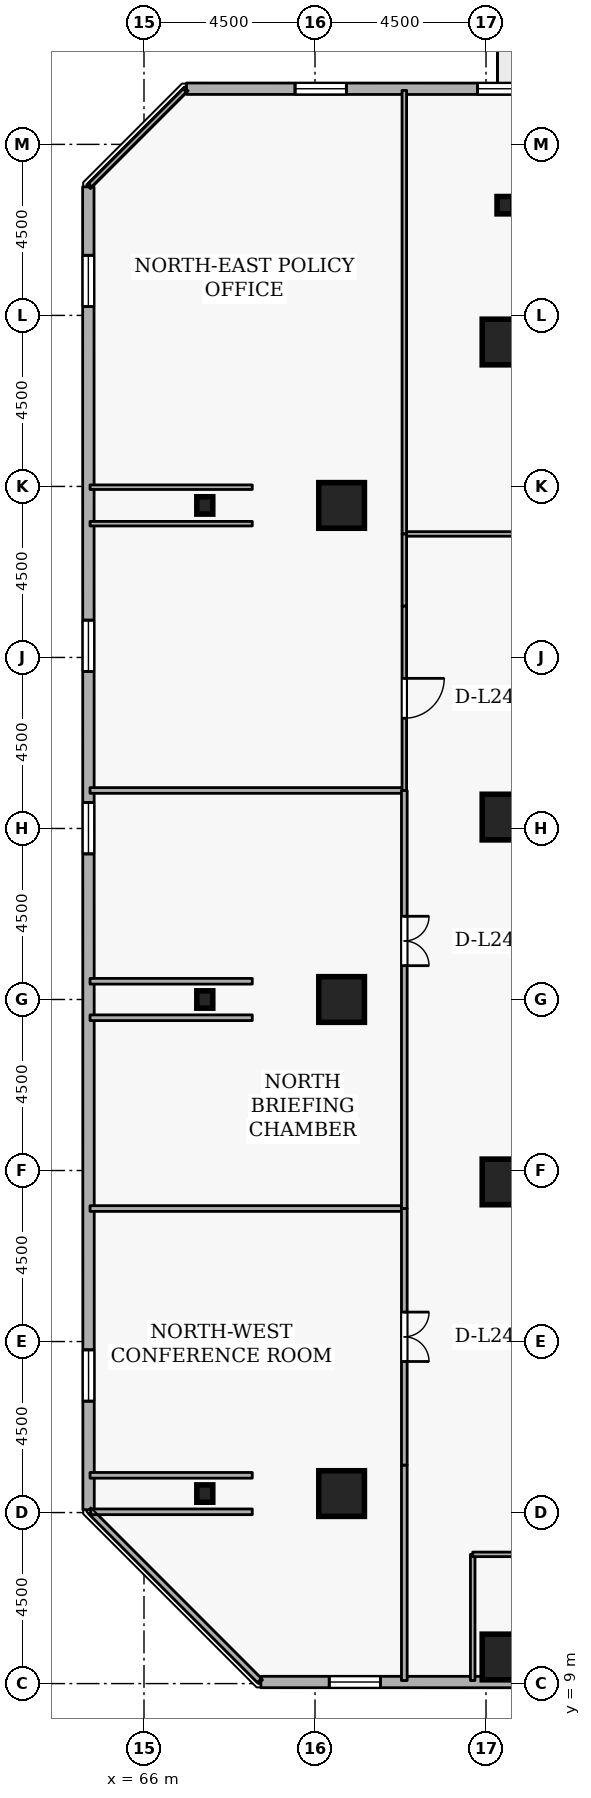
"""IFC4 building model, lengths in metres.
Left out: names, types, materials, properties, quantities, classifications, styles, units other than length and angle.
Written with IfcOpenShell. Run it as: python <this file> out.ifc"""

import sys

from ifc_helpers import new_model, si_unit, direction, frame, frame_2d, origin, origin_2d, place, context, subcontext, project, spatial, rectangle, i_section, extrude, element, fill, save


model = new_model("IFC4")
c1 = context("Model", 3, precision=1e-05, world=origin(), true_north=direction((0.0, 1.0)))
c2 = subcontext(c1, "Body", "Model", "MODEL_VIEW")
j1 = project(units=[si_unit("LENGTHUNIT", "METRE"), si_unit("PLANEANGLEUNIT", "RADIAN")], contexts=[c1])
p1 = place(None, origin())
s1 = spatial("IfcSite", under=j1, at=p1, CompositionType="ELEMENT")
p2 = place(p1, origin())
s2 = spatial("IfcBuilding", under=s1, at=p2, CompositionType="ELEMENT")
p3 = place(p2, frame((0.0, 0.0, 94.5)))
s3 = spatial("IfcBuildingStorey", under=s2, at=p3, CompositionType="ELEMENT", Elevation=94.5)
for number, where, z_axis, x_axis in (
    (1, (75.5, 44.3, 0.0), (0.0, 0.0, 1.0), (1.0, 0.0, 0.0)),
    (2, (71.2, 14.0, 0.0), (0.0, 0.0, 1.0), (1.0, 0.0, 0.0)),
    (3, (71.2, 27.0, 0.0), (0.0, 0.0, 1.0), (1.0, 0.0, 0.0)),
    (4, (71.2, 40.0, 0.0), (0.0, 0.0, 1.0), (1.0, 0.0, 0.0)),
    (5, (75.5, 9.7, 0.0), (0.0, 0.0, 1.0), (1.0, 0.0, 0.0)),
    (6, (75.5, 22.2, 0.0), (0.0, 0.0, 1.0), (1.0, 0.0, 0.0)),
    (7, (75.5, 31.8, 0.0), (0.0, 0.0, 1.0), (1.0, 0.0, 0.0)),
):
    element("IfcColumn", number, at=place(p3, frame(where, z_axis=z_axis, x_axis=x_axis)), inside=s3, PredefinedType="COLUMN", context=c2, shape_type="SweptSolid", body=[
        extrude(rectangle(XDim=1.2, YDim=1.2, at=origin_2d()), origin(), (0.0, 0.0, 1.0), 3.6),
    ])
for number, where, z_axis, x_axis in (
    (8, (75.5, 47.9, 0.0), (0.0, 0.0, 1.0), (1.0, 0.0, 0.0)),
    (9, (67.6, 14.0, 0.0), (0.0, 0.0, 1.0), (1.0, 0.0, 0.0)),
    (10, (67.6, 27.0, 0.0), (0.0, 0.0, 1.0), (1.0, 0.0, 0.0)),
    (11, (67.6, 40.0, 0.0), (0.0, 0.0, 1.0), (1.0, 0.0, 0.0)),
):
    element("IfcColumn", number, at=place(p3, frame(where, z_axis=z_axis, x_axis=x_axis)), inside=s3, PredefinedType="COLUMN", context=c2, shape_type="SweptSolid", body=[
        extrude(i_section(OverallWidth=0.418, OverallDepth=0.456, WebThickness=0.042, FlangeThickness=0.067, FilletRadius=0.015, at=origin_2d()), origin(), (0.0, 0.0, 1.0), 3.6),
    ])
p4 = place(p3, frame((69.075, 9.042, 0.0), z_axis=(0.0, 0.0, 1.0), x_axis=(0.999999983371, -0.000182370391, 0.0)))
e12 = element("IfcWall", 12, at=p4, inside=s3, PredefinedType="STANDARD", context=c2, shape_type="SweptSolid", body=[
    extrude(rectangle(XDim=34.806, YDim=0.3, at=frame_2d((17.403, 0.0))), origin(), (0.0, 0.0, 1.0), 2.22),
])
p5 = place(p4, frame((1.8, 0.0, 0.72)))
e13 = element("IfcOpeningElement", 13, at=p5, cuts=e12, PredefinedType="OPENING", context=c2, shape_type="SweptSolid", body=[
    extrude(rectangle(XDim=1.35, YDim=1.05, at=frame_2d((0.675, 0.525))), frame((0.0, 0.16, 0.0), z_axis=(0.0, -1.0, 0.0), x_axis=(1.0, 0.0, 0.0)), (0.0, 0.0, 1.0), 0.32),
])
p6 = place(p4, frame((11.4, 0.0, 0.72)))
e14 = element("IfcOpeningElement", 14, at=p6, cuts=e12, PredefinedType="OPENING", context=c2, shape_type="SweptSolid", body=[
    extrude(rectangle(XDim=1.35, YDim=1.05, at=frame_2d((0.675, 0.525))), frame((0.0, 0.16, 0.0), z_axis=(0.0, -1.0, 0.0), x_axis=(1.0, 0.0, 0.0)), (0.0, 0.0, 1.0), 0.32),
])
p7 = place(p4, frame((21.0, 0.0, 0.72)))
e15 = element("IfcOpeningElement", 15, at=p7, cuts=e12, PredefinedType="OPENING", context=c2, shape_type="SweptSolid", body=[
    extrude(rectangle(XDim=1.35, YDim=1.05, at=frame_2d((0.675, 0.525))), frame((0.0, 0.16, 0.0), z_axis=(0.0, -1.0, 0.0), x_axis=(1.0, 0.0, 0.0)), (0.0, 0.0, 1.0), 0.32),
])
p8 = place(p4, frame((25.8, 0.0, 0.72)))
e16 = element("IfcOpeningElement", 16, at=p8, cuts=e12, PredefinedType="OPENING", context=c2, shape_type="SweptSolid", body=[
    extrude(rectangle(XDim=1.35, YDim=1.05, at=frame_2d((0.675, 0.525))), frame((0.0, 0.16, 0.0), z_axis=(0.0, -1.0, 0.0), x_axis=(1.0, 0.0, 0.0)), (0.0, 0.0, 1.0), 0.32),
])
p9 = place(p3, frame((101.925, 50.958, 0.0), z_axis=(0.0, 0.0, 1.0), x_axis=(-0.999999983371, 0.000182370391, 0.0)))
e17 = element("IfcWall", 17, at=p9, inside=s3, PredefinedType="STANDARD", context=c2, shape_type="SweptSolid", body=[
    extrude(rectangle(XDim=34.806, YDim=0.3, at=frame_2d((17.403, 0.0))), origin(), (0.0, 0.0, 1.0), 2.22),
])
p10 = place(p9, frame((19.203, 0.0, 0.0)))
e18 = element("IfcOpeningElement", 18, at=p10, cuts=e17, PredefinedType="OPENING", context=c2, shape_type="SweptSolid", body=[
    extrude(rectangle(XDim=1.0, YDim=2.08, at=frame_2d((0.5, 1.04))), frame((0.0, 0.16, 0.0), z_axis=(0.0, -1.0, 0.0), x_axis=(1.0, 0.0, 0.0)), (0.0, 0.0, 1.0), 0.32),
])
p11 = place(p9, frame((1.8, 0.0, 0.72)))
e19 = element("IfcOpeningElement", 19, at=p11, cuts=e17, PredefinedType="OPENING", context=c2, shape_type="SweptSolid", body=[
    extrude(rectangle(XDim=1.35, YDim=1.05, at=frame_2d((0.675, 0.525))), frame((0.0, 0.16, 0.0), z_axis=(0.0, -1.0, 0.0), x_axis=(1.0, 0.0, 0.0)), (0.0, 0.0, 1.0), 0.32),
])
p12 = place(p9, frame((6.6, 0.0, 0.72)))
e20 = element("IfcOpeningElement", 20, at=p12, cuts=e17, PredefinedType="OPENING", context=c2, shape_type="SweptSolid", body=[
    extrude(rectangle(XDim=1.35, YDim=1.05, at=frame_2d((0.675, 0.525))), frame((0.0, 0.16, 0.0), z_axis=(0.0, -1.0, 0.0), x_axis=(1.0, 0.0, 0.0)), (0.0, 0.0, 1.0), 0.32),
])
p13 = place(p9, frame((11.4, 0.0, 0.72)))
e21 = element("IfcOpeningElement", 21, at=p13, cuts=e17, PredefinedType="OPENING", context=c2, shape_type="SweptSolid", body=[
    extrude(rectangle(XDim=1.35, YDim=1.05, at=frame_2d((0.675, 0.525))), frame((0.0, 0.16, 0.0), z_axis=(0.0, -1.0, 0.0), x_axis=(1.0, 0.0, 0.0)), (0.0, 0.0, 1.0), 0.32),
])
p14 = place(p9, frame((21.0, 0.0, 0.72)))
e22 = element("IfcOpeningElement", 22, at=p14, cuts=e17, PredefinedType="OPENING", context=c2, shape_type="SweptSolid", body=[
    extrude(rectangle(XDim=1.35, YDim=1.05, at=frame_2d((0.675, 0.525))), frame((0.0, 0.16, 0.0), z_axis=(0.0, -1.0, 0.0), x_axis=(1.0, 0.0, 0.0)), (0.0, 0.0, 1.0), 0.32),
])
p15 = place(p9, frame((25.8, 0.0, 0.72)))
e23 = element("IfcOpeningElement", 23, at=p15, cuts=e17, PredefinedType="OPENING", context=c2, shape_type="SweptSolid", body=[
    extrude(rectangle(XDim=1.35, YDim=1.05, at=frame_2d((0.675, 0.525))), frame((0.0, 0.16, 0.0), z_axis=(0.0, -1.0, 0.0), x_axis=(1.0, 0.0, 0.0)), (0.0, 0.0, 1.0), 0.32),
])
p16 = place(p9, frame((30.6, 0.0, 0.72)))
e24 = element("IfcOpeningElement", 24, at=p16, cuts=e17, PredefinedType="OPENING", context=c2, shape_type="SweptSolid", body=[
    extrude(rectangle(XDim=1.35, YDim=1.05, at=frame_2d((0.675, 0.525))), frame((0.0, 0.16, 0.0), z_axis=(0.0, -1.0, 0.0), x_axis=(1.0, 0.0, 0.0)), (0.0, 0.0, 1.0), 0.32),
])
p17 = place(p3, frame((64.535, 48.381, 0.0), z_axis=(0.0, 0.0, 1.0), x_axis=(0.000182370391, -0.999999983371, 0.0)))
e25 = element("IfcWall", 25, at=p17, inside=s3, PredefinedType="STANDARD", context=c2, shape_type="SweptSolid", body=[
    extrude(rectangle(XDim=34.806, YDim=0.3, at=frame_2d((17.403, 0.0))), origin(), (0.0, 0.0, 1.0), 2.22),
])
p18 = place(p17, frame((1.8, 0.0, 0.72)))
e26 = element("IfcOpeningElement", 26, at=p18, cuts=e25, PredefinedType="OPENING", context=c2, shape_type="SweptSolid", body=[
    extrude(rectangle(XDim=1.35, YDim=1.05, at=frame_2d((0.675, 0.525))), frame((0.0, 0.16, 0.0), z_axis=(0.0, -1.0, 0.0), x_axis=(1.0, 0.0, 0.0)), (0.0, 0.0, 1.0), 0.32),
])
p19 = place(p17, frame((11.4, 0.0, 0.72)))
e27 = element("IfcOpeningElement", 27, at=p19, cuts=e25, PredefinedType="OPENING", context=c2, shape_type="SweptSolid", body=[
    extrude(rectangle(XDim=1.35, YDim=1.05, at=frame_2d((0.675, 0.525))), frame((0.0, 0.16, 0.0), z_axis=(0.0, -1.0, 0.0), x_axis=(1.0, 0.0, 0.0)), (0.0, 0.0, 1.0), 0.32),
])
p20 = place(p17, frame((16.2, 0.0, 0.72)))
e28 = element("IfcOpeningElement", 28, at=p20, cuts=e25, PredefinedType="OPENING", context=c2, shape_type="SweptSolid", body=[
    extrude(rectangle(XDim=1.35, YDim=1.05, at=frame_2d((0.675, 0.525))), frame((0.0, 0.16, 0.0), z_axis=(0.0, -1.0, 0.0), x_axis=(1.0, 0.0, 0.0)), (0.0, 0.0, 1.0), 0.32),
])
p21 = place(p17, frame((30.6, 0.0, 0.72)))
e29 = element("IfcOpeningElement", 29, at=p21, cuts=e25, PredefinedType="OPENING", context=c2, shape_type="SweptSolid", body=[
    extrude(rectangle(XDim=1.35, YDim=1.05, at=frame_2d((0.675, 0.525))), frame((0.0, 0.16, 0.0), z_axis=(0.0, -1.0, 0.0), x_axis=(1.0, 0.0, 0.0)), (0.0, 0.0, 1.0), 0.32),
])
p22 = place(p3, frame((74.65, 9.08, 0.0), z_axis=(0.0, 0.0, 1.0), x_axis=(0.0, 1.0, 0.0)))
e30 = element("IfcWall", 30, at=p22, inside=s3, PredefinedType="PARTITIONING", context=c2, shape_type="SweptSolid", body=[
    extrude(rectangle(XDim=3.32, YDim=0.12, at=frame_2d((1.66, 0.0))), origin(), (0.0, 0.0, 1.0), 3.3),
])
p23 = place(p3, frame((74.65, 12.4, 0.0), z_axis=(0.0, 0.0, 1.0), x_axis=(1.0, 0.0, 0.0)))
e31 = element("IfcWall", 31, at=p23, inside=s3, PredefinedType="PARTITIONING", context=c2, shape_type="SweptSolid", body=[
    extrude(rectangle(XDim=4.802, YDim=0.12, at=frame_2d((2.401, 0.0))), origin(), (0.0, 0.0, 1.0), 3.3),
])
p24 = place(p3, frame((82.2, 39.25, 0.0), z_axis=(0.0, 0.0, 1.0), x_axis=(-1.0, 0.0, 0.0)))
e32 = element("IfcWall", 32, at=p24, inside=s3, PredefinedType="PARTITIONING", context=c2, shape_type="SweptSolid", body=[
    extrude(rectangle(XDim=9.35, YDim=0.12, at=frame_2d((4.675, 0.0))), origin(), (0.0, 0.0, 1.0), 3.3),
])
p25 = place(p24, frame((4.15, 0.0, 0.0)))
e33 = element("IfcOpeningElement", 33, at=p25, cuts=e32, PredefinedType="OPENING", context=c2, shape_type="SweptSolid", body=[
    extrude(rectangle(XDim=1.05, YDim=2.1, at=frame_2d((0.525, 1.05))), frame((0.0, 0.07, 0.0), z_axis=(0.0, -1.0, 0.0), x_axis=(1.0, 0.0, 0.0)), (0.0, 0.0, 1.0), 0.14),
])
p26 = place(p3, frame((72.85, 39.25, 0.0), z_axis=(0.0, 0.0, 1.0), x_axis=(0.0, 1.0, 0.0)))
e34 = element("IfcWall", 34, at=p26, inside=s3, PredefinedType="PARTITIONING", context=c2, shape_type="SweptSolid", body=[
    extrude(rectangle(XDim=11.67, YDim=0.12, at=frame_2d((5.835, 0.0))), origin(), (0.0, 0.0, 1.0), 3.3),
])
p27 = place(p3, frame((72.85, 14.75, 0.0), z_axis=(0.0, 0.0, 1.0), x_axis=(0.0, -1.0, 0.0)))
e35 = element("IfcWall", 35, at=p27, inside=s3, PredefinedType="PARTITIONING", context=c2, shape_type="SweptSolid", body=[
    extrude(rectangle(XDim=5.67, YDim=0.15, at=frame_2d((2.835, 0.0))), origin(), (0.0, 0.0, 1.0), 3.3),
])
p28 = place(p3, frame((69.039, 9.08, 0.0), z_axis=(0.0, 0.0, 1.0), x_axis=(-0.707106781187, 0.707106781187, 0.0)))
e36 = element("IfcWall", 36, at=p28, inside=s3, PredefinedType="PARTITIONING", context=c2, shape_type="SweptSolid", body=[
    extrude(rectangle(XDim=6.279, YDim=0.15, at=frame_2d((3.14, 0.0))), origin(), (0.0, 0.0, 1.0), 3.3),
])
p29 = place(p3, frame((64.599, 13.52, 0.0), z_axis=(0.0, 0.0, 1.0), x_axis=(1.0, 0.0, 0.0)))
e37 = element("IfcWall", 37, at=p29, inside=s3, PredefinedType="PARTITIONING", context=c2, shape_type="SweptSolid", body=[
    extrude(rectangle(XDim=4.25, YDim=0.15, at=frame_2d((2.125, 0.0))), origin(), (0.0, 0.0, 1.0), 1.685),
])
p30 = place(p3, frame((68.849, 14.48, 0.0), z_axis=(0.0, 0.0, 1.0), x_axis=(-1.0, 0.0, 0.0)))
e38 = element("IfcWall", 38, at=p30, inside=s3, PredefinedType="PARTITIONING", context=c2, shape_type="SweptSolid", body=[
    extrude(rectangle(XDim=4.269, YDim=0.15, at=frame_2d((2.135, 0.0))), origin(), (0.0, 0.0, 1.0), 1.685),
])
p31 = place(p3, frame((64.58, 21.5, 0.0), z_axis=(0.0, 0.0, 1.0), x_axis=(1.0, 0.0, 0.0)))
e39 = element("IfcWall", 39, at=p31, inside=s3, PredefinedType="PARTITIONING", context=c2, shape_type="SweptSolid", body=[
    extrude(rectangle(XDim=8.27, YDim=0.15, at=frame_2d((4.135, 0.0))), origin(), (0.0, 0.0, 1.0), 3.3),
])
p32 = place(p3, frame((72.85, 21.5, 0.0), z_axis=(0.0, 0.0, 1.0), x_axis=(0.0, -1.0, 0.0)))
e40 = element("IfcWall", 40, at=p32, inside=s3, PredefinedType="PARTITIONING", context=c2, shape_type="SweptSolid", body=[
    extrude(rectangle(XDim=6.75, YDim=0.15, at=frame_2d((3.375, 0.0))), origin(), (0.0, 0.0, 1.0), 3.3),
])
p33 = place(p32, frame((2.725, 0.0, 0.0)))
e41 = element("IfcOpeningElement", 41, at=p33, cuts=e40, PredefinedType="OPENING", context=c2, shape_type="SweptSolid", body=[
    extrude(rectangle(XDim=1.3, YDim=2.12, at=frame_2d((0.65, 1.06))), frame((0.0, 0.085, 0.0), z_axis=(0.0, -1.0, 0.0), x_axis=(1.0, 0.0, 0.0)), (0.0, 0.0, 1.0), 0.17),
])
for number, where, z_axis, x_axis in (
    (42, (64.58, 26.52, 0.0), (0.0, 0.0, 1.0), (1.0, 0.0, 0.0)),
    (43, (68.849, 27.48, 0.0), (0.0, 0.0, 1.0), (-1.0, 0.0, 0.0)),
):
    element("IfcWall", number, at=place(p3, frame(where, z_axis=z_axis, x_axis=x_axis)), inside=s3, PredefinedType="PARTITIONING", context=c2, shape_type="SweptSolid", body=[
        extrude(rectangle(XDim=4.269, YDim=0.15, at=frame_2d((2.135, 0.0))), origin(), (0.0, 0.0, 1.0), 1.685),
    ])
p34 = place(p3, frame((64.58, 32.5, 0.0), z_axis=(0.0, 0.0, 1.0), x_axis=(1.0, 0.0, 0.0)))
e44 = element("IfcWall", 44, at=p34, inside=s3, PredefinedType="PARTITIONING", context=c2, shape_type="SweptSolid", body=[
    extrude(rectangle(XDim=8.27, YDim=0.15, at=frame_2d((4.135, 0.0))), origin(), (0.0, 0.0, 1.0), 3.3),
])
p35 = place(p3, frame((72.85, 32.5, 0.0), z_axis=(0.0, 0.0, 1.0), x_axis=(0.0, -1.0, 0.0)))
e45 = element("IfcWall", 45, at=p35, inside=s3, PredefinedType="PARTITIONING", context=c2, shape_type="SweptSolid", body=[
    extrude(rectangle(XDim=11.0, YDim=0.15, at=frame_2d((5.5, 0.0))), origin(), (0.0, 0.0, 1.0), 3.3),
])
p36 = place(p35, frame((3.31, 0.0, 0.0)))
e46 = element("IfcOpeningElement", 46, at=p36, cuts=e45, PredefinedType="OPENING", context=c2, shape_type="SweptSolid", body=[
    extrude(rectangle(XDim=1.3, YDim=2.12, at=frame_2d((0.65, 1.06))), frame((0.0, 0.085, 0.0), z_axis=(0.0, -1.0, 0.0), x_axis=(1.0, 0.0, 0.0)), (0.0, 0.0, 1.0), 0.17),
])
for number, where, z_axis, x_axis in (
    (47, (64.58, 39.52, 0.0), (0.0, 0.0, 1.0), (1.0, 0.0, 0.0)),
    (48, (68.849, 40.48, 0.0), (0.0, 0.0, 1.0), (-1.0, 0.0, 0.0)),
):
    element("IfcWall", number, at=place(p3, frame(where, z_axis=z_axis, x_axis=x_axis)), inside=s3, PredefinedType="PARTITIONING", context=c2, shape_type="SweptSolid", body=[
        extrude(rectangle(XDim=4.269, YDim=0.12, at=frame_2d((2.135, 0.0))), origin(), (0.0, 0.0, 1.0), 1.685),
    ])
p37 = place(p3, frame((64.58, 48.425, 0.0), z_axis=(0.0, 0.0, 1.0), x_axis=(0.707106781187, 0.707106781187, 0.0)))
e49 = element("IfcWall", 49, at=p37, inside=s3, PredefinedType="PARTITIONING", context=c2, shape_type="SweptSolid", body=[
    extrude(rectangle(XDim=3.528, YDim=0.12, at=frame_2d((1.764, 0.0))), origin(), (0.0, 0.0, 1.0), 3.3),
])
p38 = place(p3, frame((72.85, 39.25, 0.0), z_axis=(0.0, 0.0, 1.0), x_axis=(0.0, -1.0, 0.0)))
e50 = element("IfcWall", 50, at=p38, inside=s3, PredefinedType="PARTITIONING", context=c2, shape_type="SweptSolid", body=[
    extrude(rectangle(XDim=1.9, YDim=0.12, at=frame_2d((0.95, 0.0))), origin(), (0.0, 0.0, 1.0), 2.855),
])
p39 = place(p3, frame((72.85, 37.35, 0.0), z_axis=(0.0, 0.0, 1.0), x_axis=(0.0, -1.0, 0.0)))
e51 = element("IfcWall", 51, at=p39, inside=s3, PredefinedType="PARTITIONING", context=c2, shape_type="SweptSolid", body=[
    extrude(rectangle(XDim=4.85, YDim=0.12, at=frame_2d((2.425, 0.0))), origin(), (0.0, 0.0, 1.0), 2.855),
])
p40 = place(p39, frame((1.9, 0.0, 0.0)))
e52 = element("IfcOpeningElement", 52, at=p40, cuts=e51, PredefinedType="OPENING", context=c2, shape_type="SweptSolid", body=[
    extrude(rectangle(XDim=1.05, YDim=2.1, at=frame_2d((0.525, 1.05))), frame((0.0, 0.07, 0.0), z_axis=(0.0, -1.0, 0.0), x_axis=(1.0, 0.0, 0.0)), (0.0, 0.0, 1.0), 0.14),
])
p41 = place(p5, origin())
e53 = element("IfcWindow", 53, at=p41, inside=s3, PartitioningType="SINGLE_PANEL", PredefinedType="WINDOW", context=c2, shape_type="SweptSolid", body=[
    extrude(rectangle(XDim=1.35, YDim=1.05, at=frame_2d((0.675, 0.525))), frame((0.0, 0.03, 0.0), z_axis=(0.0, -1.0, 0.0), x_axis=(1.0, 0.0, 0.0)), (0.0, 0.0, 1.0), 0.06),
])
fill(e13, e53)
p42 = place(p15, origin())
e54 = element("IfcWindow", 54, at=p42, inside=s3, PartitioningType="SINGLE_PANEL", PredefinedType="WINDOW", context=c2, shape_type="SweptSolid", body=[
    extrude(rectangle(XDim=1.35, YDim=1.05, at=frame_2d((0.675, 0.525))), frame((0.0, 0.03, 0.0), z_axis=(0.0, -1.0, 0.0), x_axis=(1.0, 0.0, 0.0)), (0.0, 0.0, 1.0), 0.06),
])
fill(e23, e54)
p43 = place(p16, origin())
e55 = element("IfcWindow", 55, at=p43, inside=s3, PartitioningType="SINGLE_PANEL", PredefinedType="WINDOW", context=c2, shape_type="SweptSolid", body=[
    extrude(rectangle(XDim=1.35, YDim=1.05, at=frame_2d((0.675, 0.525))), frame((0.0, 0.03, 0.0), z_axis=(0.0, -1.0, 0.0), x_axis=(1.0, 0.0, 0.0)), (0.0, 0.0, 1.0), 0.06),
])
fill(e24, e55)
p44 = place(p18, origin())
e56 = element("IfcWindow", 56, at=p44, inside=s3, PartitioningType="SINGLE_PANEL", PredefinedType="WINDOW", context=c2, shape_type="SweptSolid", body=[
    extrude(rectangle(XDim=1.35, YDim=1.05, at=frame_2d((0.675, 0.525))), frame((0.0, 0.03, 0.0), z_axis=(0.0, -1.0, 0.0), x_axis=(1.0, 0.0, 0.0)), (0.0, 0.0, 1.0), 0.06),
])
fill(e26, e56)
p45 = place(p19, origin())
e57 = element("IfcWindow", 57, at=p45, inside=s3, PartitioningType="SINGLE_PANEL", PredefinedType="WINDOW", context=c2, shape_type="SweptSolid", body=[
    extrude(rectangle(XDim=1.35, YDim=1.05, at=frame_2d((0.675, 0.525))), frame((0.0, 0.03, 0.0), z_axis=(0.0, -1.0, 0.0), x_axis=(1.0, 0.0, 0.0)), (0.0, 0.0, 1.0), 0.06),
])
fill(e27, e57)
p46 = place(p20, origin())
e58 = element("IfcWindow", 58, at=p46, inside=s3, PartitioningType="SINGLE_PANEL", PredefinedType="WINDOW", context=c2, shape_type="SweptSolid", body=[
    extrude(rectangle(XDim=1.35, YDim=1.05, at=frame_2d((0.675, 0.525))), frame((0.0, 0.03, 0.0), z_axis=(0.0, -1.0, 0.0), x_axis=(1.0, 0.0, 0.0)), (0.0, 0.0, 1.0), 0.06),
])
fill(e28, e58)
p47 = place(p21, origin())
e59 = element("IfcWindow", 59, at=p47, inside=s3, PartitioningType="SINGLE_PANEL", PredefinedType="WINDOW", context=c2, shape_type="SweptSolid", body=[
    extrude(rectangle(XDim=1.35, YDim=1.05, at=frame_2d((0.675, 0.525))), frame((0.0, 0.03, 0.0), z_axis=(0.0, -1.0, 0.0), x_axis=(1.0, 0.0, 0.0)), (0.0, 0.0, 1.0), 0.06),
])
fill(e29, e59)
p48 = place(p33, origin())
e60 = element("IfcDoor", 60, at=p48, inside=s3, OperationType="DOUBLE_DOOR_SINGLE_SWING", PredefinedType="DOOR", context=c2, shape_type="SweptSolid", body=[
    extrude(rectangle(XDim=1.3, YDim=2.12, at=frame_2d((0.65, 1.06))), frame((0.0, 0.025, 0.0), z_axis=(0.0, -1.0, 0.0), x_axis=(1.0, 0.0, 0.0)), (0.0, 0.0, 1.0), 0.05),
])
fill(e41, e60)
p49 = place(p36, origin())
e61 = element("IfcDoor", 61, at=p49, inside=s3, OperationType="DOUBLE_DOOR_SINGLE_SWING", PredefinedType="DOOR", context=c2, shape_type="SweptSolid", body=[
    extrude(rectangle(XDim=1.3, YDim=2.12, at=frame_2d((0.65, 1.06))), frame((0.0, 0.025, 0.0), z_axis=(0.0, -1.0, 0.0), x_axis=(1.0, 0.0, 0.0)), (0.0, 0.0, 1.0), 0.05),
])
fill(e46, e61)
p50 = place(p40, origin())
e62 = element("IfcDoor", 62, at=p50, inside=s3, OperationType="SINGLE_SWING_LEFT", PredefinedType="DOOR", context=c2, shape_type="SweptSolid", body=[
    extrude(rectangle(XDim=1.05, YDim=2.1, at=frame_2d((0.525, 1.05))), frame((0.0, 0.025, 0.0), z_axis=(0.0, -1.0, 0.0), x_axis=(1.0, 0.0, 0.0)), (0.0, 0.0, 1.0), 0.05),
])
fill(e52, e62)
save(model, sys.argv[1])
